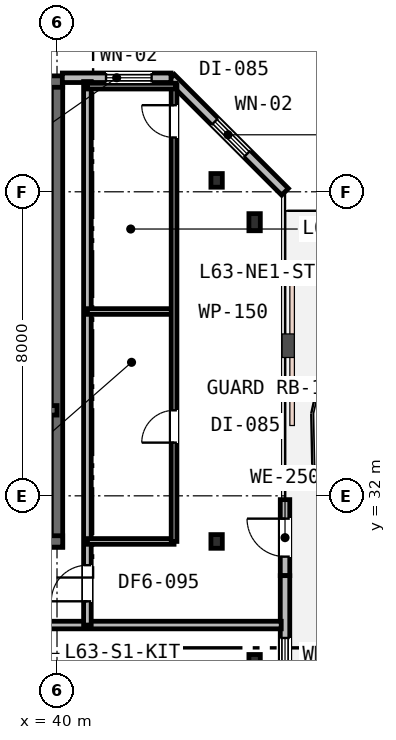
"""IFC4 building model, lengths in metres.
Left out: names, types, materials, properties, quantities, classifications, styles, units other than length and angle.
Written with IfcOpenShell. Run it as: python <this file> out.ifc"""

import sys

from ifc_helpers import new_model, si_unit, direction, frame, frame_2d, origin, origin_2d, place, context, subcontext, project, spatial, rectangle, i_section, extrude, element, fill, save


model = new_model("IFC4")
c1 = context("Model", 3, precision=1e-05, world=origin(), true_north=direction((0.0, 1.0)))
c2 = subcontext(c1, "Body", "Model", "MODEL_VIEW")
j1 = project(units=[si_unit("LENGTHUNIT", "METRE"), si_unit("PLANEANGLEUNIT", "RADIAN")], contexts=[c1])
p1 = place(None, origin())
s1 = spatial("IfcSite", under=j1, at=p1, CompositionType="ELEMENT")
p2 = place(p1, origin())
s2 = spatial("IfcBuilding", under=s1, at=p2, CompositionType="ELEMENT")
p3 = place(p2, frame((0.0, 0.0, 245.0)))
s3 = spatial("IfcBuildingStorey", under=s2, at=p3, CompositionType="ELEMENT", Elevation=245.0)
p4 = place(p3, frame((40.0, 30.65, 0.0), z_axis=(0.0, 0.0, 1.0), x_axis=(0.0, 1.0, 0.0)))
e1 = element("IfcWall", 1, at=p4, inside=s3, PredefinedType="SHEAR", context=c2, shape_type="SweptSolid", body=[
    extrude(rectangle(XDim=12.3, YDim=0.3, at=frame_2d((6.15, 0.0))), origin(), (0.0, 0.0, 1.0), 3.8),
])
p5 = place(p3, frame((15.85, 42.9, 0.0), z_axis=(0.0, 0.0, 1.0), x_axis=(1.0, 0.0, 0.0)))
e2 = element("IfcWall", 2, at=p5, inside=s3, PredefinedType="SHEAR", context=c2, shape_type="SweptSolid", body=[
    extrude(rectangle(XDim=24.3, YDim=0.3, at=frame_2d((12.15, 0.0))), origin(), (0.0, 0.0, 1.0), 3.8),
])
p6 = place(p5, frame((1.6, 0.0, 0.95)))
e3 = element("IfcOpeningElement", 3, at=p6, cuts=e2, PredefinedType="OPENING", context=c2, shape_type="SweptSolid", body=[
    extrude(rectangle(XDim=1.2, YDim=1.6, at=frame_2d((0.6, 0.8))), frame((0.0, 0.16, 0.0), z_axis=(0.0, -1.0, 0.0), x_axis=(1.0, 0.0, 0.0)), (0.0, 0.0, 1.0), 0.32),
])
p7 = place(p5, frame((16.5, 0.0, 0.95)))
e4 = element("IfcOpeningElement", 4, at=p7, cuts=e2, PredefinedType="OPENING", context=c2, shape_type="SweptSolid", body=[
    extrude(rectangle(XDim=1.2, YDim=1.6, at=frame_2d((0.6, 0.8))), frame((0.0, 0.16, 0.0), z_axis=(0.0, -1.0, 0.0), x_axis=(1.0, 0.0, 0.0)), (0.0, 0.0, 1.0), 0.32),
])
p8 = place(p5, frame((21.6, 0.0, 0.95)))
e5 = element("IfcOpeningElement", 5, at=p8, cuts=e2, PredefinedType="OPENING", context=c2, shape_type="SweptSolid", body=[
    extrude(rectangle(XDim=1.2, YDim=1.6, at=frame_2d((0.6, 0.8))), frame((0.0, 0.16, 0.0), z_axis=(0.0, -1.0, 0.0), x_axis=(1.0, 0.0, 0.0)), (0.0, 0.0, 1.0), 0.32),
])
p9 = place(p3, frame((28.95, 30.8, 0.0), z_axis=(0.0, 0.0, 1.0), x_axis=(1.0, 0.0, 0.0)))
e6 = element("IfcWall", 6, at=p9, inside=s3, PredefinedType="SHEAR", context=c2, shape_type="SweptSolid", body=[
    extrude(rectangle(XDim=11.2, YDim=0.3, at=frame_2d((5.6, 0.0))), origin(), (0.0, 0.0, 1.0), 3.8),
])
p10 = place(p9, frame((7.65, 0.0, 0.0)))
e7 = element("IfcOpeningElement", 7, at=p10, cuts=e6, PredefinedType="OPENING", context=c2, shape_type="SweptSolid", body=[
    extrude(rectangle(XDim=1.1, YDim=2.15, at=frame_2d((0.55, 1.075))), frame((0.0, 0.16, 0.0), z_axis=(0.0, -1.0, 0.0), x_axis=(1.0, 0.0, 0.0)), (0.0, 0.0, 1.0), 0.32),
])
p11 = place(p3, frame((33.95, 34.25, 0.0), z_axis=(0.0, 0.0, 1.0), x_axis=(1.0, 0.0, 0.0)))
e8 = element("IfcWall", 8, at=p11, inside=s3, PredefinedType="SHEAR", context=c2, shape_type="SweptSolid", body=[
    extrude(rectangle(XDim=6.05, YDim=0.25, at=frame_2d((3.025, 0.0))), origin(), (0.0, 0.0, 1.0), 3.8),
])
p12 = place(p11, frame((3.7, 0.0, 0.0)))
e9 = element("IfcOpeningElement", 9, at=p12, cuts=e8, PredefinedType="OPENING", context=c2, shape_type="SweptSolid", body=[
    extrude(rectangle(XDim=1.0, YDim=2.15, at=frame_2d((0.5, 1.075))), frame((0.0, 0.135, 0.0), z_axis=(0.0, -1.0, 0.0), x_axis=(1.0, 0.0, 0.0)), (0.0, 0.0, 1.0), 0.27),
])
p13 = place(p11, frame((0.55, 0.0, 0.0)))
e10 = element("IfcOpeningElement", 10, at=p13, cuts=e8, PredefinedType="OPENING", context=c2, shape_type="SweptSolid", body=[
    extrude(rectangle(XDim=1.1, YDim=2.15, at=frame_2d((0.55, 1.075))), frame((0.0, 0.135, 0.0), z_axis=(0.0, -1.0, 0.0), x_axis=(1.0, 0.0, 0.0)), (0.0, 0.0, 1.0), 0.27),
])
for number, where, z_axis, x_axis in (
    (11, (45.2, 27.6, 0.0), (0.0, 0.0, 1.0), (1.0, 0.0, 0.0)),
    (12, (45.2, 39.2, 0.0), (0.0, 0.0, 1.0), (1.0, 0.0, 0.0)),
):
    element("IfcColumn", number, at=place(p3, frame(where, z_axis=z_axis, x_axis=x_axis)), inside=s3, PredefinedType="COLUMN", context=c2, shape_type="SweptSolid", body=[
        extrude(i_section(OverallWidth=0.3, OverallDepth=0.45, WebThickness=0.014, FlangeThickness=0.026, FilletRadius=0.027, at=origin_2d()), origin(), (0.0, 0.0, 1.0), 3.8),
    ])
for number, where, z_axis, x_axis in (
    (13, (44.2, 30.8, 0.0), (0.0, 0.0, 1.0), (1.0, 0.0, 0.0)),
    (14, (44.2, 40.3, 0.0), (0.0, 0.0, 1.0), (1.0, 0.0, 0.0)),
):
    element("IfcColumn", number, at=place(p3, frame(where, z_axis=z_axis, x_axis=x_axis)), inside=s3, PredefinedType="COLUMN", context=c2, shape_type="SweptSolid", body=[
        extrude(i_section(OverallWidth=0.3, OverallDepth=0.36, WebThickness=0.013, FlangeThickness=0.022, FilletRadius=0.027, at=origin_2d()), origin(), (0.0, 0.0, 1.0), 3.8),
    ])
p14 = place(p3, frame((46.0, 29.9, 0.0), z_axis=(0.0, 0.0, 1.0), x_axis=(0.0, 1.0, 0.0)))
e15 = element("IfcWall", 15, at=p14, inside=s3, PredefinedType="STANDARD", context=c2, shape_type="SweptSolid", body=[
    extrude(rectangle(XDim=2.0, YDim=0.25, at=frame_2d((1.0, 0.0))), origin(), (0.0, 0.0, 1.0), 3.53),
])
p15 = place(p14, frame((0.5, 0.0, 0.0)))
e16 = element("IfcOpeningElement", 16, at=p15, cuts=e15, PredefinedType="OPENING", context=c2, shape_type="SweptSolid", body=[
    extrude(rectangle(XDim=1.0, YDim=2.15, at=frame_2d((0.5, 1.075))), frame((0.0, 0.135, 0.0), z_axis=(0.0, -1.0, 0.0), x_axis=(1.0, 0.0, 0.0)), (0.0, 0.0, 1.0), 0.27),
])
p16 = place(p3, frame((46.0, 27.0, 0.0), z_axis=(0.0, 0.0, 1.0), x_axis=(0.0, 1.0, 0.0)))
e17 = element("IfcWall", 17, at=p16, inside=s3, PredefinedType="STANDARD", context=c2, shape_type="SweptSolid", body=[
    extrude(rectangle(XDim=2.9, YDim=0.25, at=frame_2d((1.45, 0.0))), origin(), (0.0, 0.0, 1.0), 3.53),
])
p17 = place(p16, frame((0.36, 0.0, 0.9)))
e18 = element("IfcOpeningElement", 18, at=p17, cuts=e17, PredefinedType="OPENING", context=c2, shape_type="SweptSolid", body=[
    extrude(rectangle(XDim=0.9, YDim=1.55, at=frame_2d((0.45, 0.775))), frame((0.0, 0.135, 0.0), z_axis=(0.0, -1.0, 0.0), x_axis=(1.0, 0.0, 0.0)), (0.0, 0.0, 1.0), 0.27),
])
p18 = place(p3, frame((46.0, 40.0, 0.0), z_axis=(0.0, 0.0, 1.0), x_axis=(-0.707106781187, 0.707106781187, 0.0)))
e19 = element("IfcWall", 19, at=p18, inside=s3, PredefinedType="STANDARD", context=c2, shape_type="SweptSolid", body=[
    extrude(rectangle(XDim=4.243, YDim=0.25, at=frame_2d((2.121, 0.0))), origin(), (0.0, 0.0, 1.0), 3.53),
])
p19 = place(p18, frame((1.411, 0.0, 0.85)))
e20 = element("IfcOpeningElement", 20, at=p19, cuts=e19, PredefinedType="OPENING", context=c2, shape_type="SweptSolid", body=[
    extrude(rectangle(XDim=1.2, YDim=1.6, at=frame_2d((0.6, 0.8))), frame((0.0, 0.135, 0.0), z_axis=(0.0, -1.0, 0.0), x_axis=(1.0, 0.0, 0.0)), (0.0, 0.0, 1.0), 0.27),
])
p20 = place(p3, frame((43.0, 43.0, 0.0), z_axis=(0.0, 0.0, 1.0), x_axis=(-1.0, 0.0, 0.0)))
e21 = element("IfcWall", 21, at=p20, inside=s3, PredefinedType="STANDARD", context=c2, shape_type="SweptSolid", body=[
    extrude(rectangle(XDim=2.86, YDim=0.25, at=frame_2d((1.43, 0.0))), origin(), (0.0, 0.0, 1.0), 3.53),
])
p21 = place(p20, frame((0.51, 0.0, 0.85)))
e22 = element("IfcOpeningElement", 22, at=p21, cuts=e21, PredefinedType="OPENING", context=c2, shape_type="SweptSolid", body=[
    extrude(rectangle(XDim=1.2, YDim=1.6, at=frame_2d((0.6, 0.8))), frame((0.0, 0.135, 0.0), z_axis=(0.0, -1.0, 0.0), x_axis=(1.0, 0.0, 0.0)), (0.0, 0.0, 1.0), 0.27),
])
p22 = place(p3, frame((11.6, 28.6, 0.0), z_axis=(0.0, 0.0, 1.0), x_axis=(1.0, 0.0, 0.0)))
e23 = element("IfcWall", 23, at=p22, inside=s3, PredefinedType="PARTITIONING", context=c2, shape_type="SweptSolid", body=[
    extrude(rectangle(XDim=34.3, YDim=0.2, at=frame_2d((17.15, 0.0))), origin(), (0.0, 0.0, 1.0), 3.16),
])
p23 = place(p22, frame((14.625, 0.0, 0.0)))
e24 = element("IfcOpeningElement", 24, at=p23, cuts=e23, PredefinedType="OPENING", context=c2, shape_type="SweptSolid", body=[
    extrude(rectangle(XDim=0.95, YDim=2.15, at=frame_2d((0.475, 1.075))), frame((0.0, 0.11, 0.0), z_axis=(0.0, -1.0, 0.0), x_axis=(1.0, 0.0, 0.0)), (0.0, 0.0, 1.0), 0.22),
])
p24 = place(p22, frame((26.225, 0.0, 0.0)))
e25 = element("IfcOpeningElement", 25, at=p24, cuts=e23, PredefinedType="OPENING", context=c2, shape_type="SweptSolid", body=[
    extrude(rectangle(XDim=0.95, YDim=2.15, at=frame_2d((0.475, 1.075))), frame((0.0, 0.11, 0.0), z_axis=(0.0, -1.0, 0.0), x_axis=(1.0, 0.0, 0.0)), (0.0, 0.0, 1.0), 0.22),
])
p25 = place(p3, frame((40.8, 28.6, 0.0), z_axis=(0.0, 0.0, 1.0), x_axis=(0.0, 1.0, 0.0)))
e26 = element("IfcWall", 26, at=p25, inside=s3, PredefinedType="PARTITIONING", context=c2, shape_type="SweptSolid", body=[
    extrude(rectangle(XDim=14.3, YDim=0.2, at=frame_2d((7.15, 0.0))), origin(), (0.0, 0.0, 1.0), 3.16),
])
p26 = place(p25, frame((0.625, 0.0, 0.0)))
e27 = element("IfcOpeningElement", 27, at=p26, cuts=e26, PredefinedType="OPENING", context=c2, shape_type="SweptSolid", body=[
    extrude(rectangle(XDim=0.95, YDim=2.15, at=frame_2d((0.475, 1.075))), frame((0.0, 0.11, 0.0), z_axis=(0.0, -1.0, 0.0), x_axis=(1.0, 0.0, 0.0)), (0.0, 0.0, 1.0), 0.22),
])
p27 = place(p3, frame((40.8, 30.8, 0.0), z_axis=(0.0, 0.0, 1.0), x_axis=(1.0, 0.0, 0.0)))
e28 = element("IfcWall", 28, at=p27, inside=s3, PredefinedType="PARTITIONING", context=c2, shape_type="SweptSolid", body=[
    extrude(rectangle(XDim=2.28, YDim=0.15, at=frame_2d((1.14, 0.0))), origin(), (0.0, 0.0, 1.0), 3.16),
])
p28 = place(p3, frame((40.8, 36.85, 0.0), z_axis=(0.0, 0.0, 1.0), x_axis=(1.0, 0.0, 0.0)))
e29 = element("IfcWall", 29, at=p28, inside=s3, PredefinedType="PARTITIONING", context=c2, shape_type="SweptSolid", body=[
    extrude(rectangle(XDim=2.28, YDim=0.15, at=frame_2d((1.14, 0.0))), origin(), (0.0, 0.0, 1.0), 3.53),
])
p29 = place(p3, frame((43.08, 30.8, 0.0), z_axis=(0.0, 0.0, 1.0), x_axis=(0.0, 1.0, 0.0)))
e30 = element("IfcWall", 30, at=p29, inside=s3, PredefinedType="PARTITIONING", context=c2, shape_type="SweptSolid", body=[
    extrude(rectangle(XDim=12.02, YDim=0.15, at=frame_2d((6.01, 0.0))), origin(), (0.0, 0.0, 1.0), 3.16),
])
p30 = place(p29, frame((2.6, 0.0, 0.0)))
e31 = element("IfcOpeningElement", 31, at=p30, cuts=e30, PredefinedType="OPENING", context=c2, shape_type="SweptSolid", body=[
    extrude(rectangle(XDim=0.85, YDim=2.15, at=frame_2d((0.425, 1.075))), frame((0.0, 0.085, 0.0), z_axis=(0.0, -1.0, 0.0), x_axis=(1.0, 0.0, 0.0)), (0.0, 0.0, 1.0), 0.17),
])
p31 = place(p29, frame((10.629, 0.0, 0.0)))
e32 = element("IfcOpeningElement", 32, at=p31, cuts=e30, PredefinedType="OPENING", context=c2, shape_type="SweptSolid", body=[
    extrude(rectangle(XDim=0.85, YDim=2.15, at=frame_2d((0.425, 1.075))), frame((0.0, 0.085, 0.0), z_axis=(0.0, -1.0, 0.0), x_axis=(1.0, 0.0, 0.0)), (0.0, 0.0, 1.0), 0.17),
])
p32 = place(p3, frame((40.8, 42.78, 0.0), z_axis=(0.0, 0.0, 1.0), x_axis=(1.0, 0.0, 0.0)))
e33 = element("IfcWall", 33, at=p32, inside=s3, PredefinedType="PARTITIONING", context=c2, shape_type="SweptSolid", body=[
    extrude(rectangle(XDim=2.32, YDim=0.15, at=frame_2d((1.16, 0.0))), origin(), (0.0, 0.0, 1.0), 3.53),
])
p33 = place(p15, origin())
e34 = element("IfcDoor", 34, at=p33, inside=s3, OperationType="SINGLE_SWING_RIGHT", PredefinedType="DOOR", context=c2, shape_type="SweptSolid", body=[
    extrude(rectangle(XDim=1.0, YDim=2.15, at=frame_2d((0.5, 1.075))), frame((0.0, 0.025, 0.0), z_axis=(0.0, -1.0, 0.0), x_axis=(1.0, 0.0, 0.0)), (0.0, 0.0, 1.0), 0.05),
])
fill(e16, e34)
p34 = place(p17, origin())
e35 = element("IfcWindow", 35, at=p34, inside=s3, PartitioningType="SINGLE_PANEL", PredefinedType="WINDOW", context=c2, shape_type="SweptSolid", body=[
    extrude(rectangle(XDim=0.9, YDim=1.55, at=frame_2d((0.45, 0.775))), frame((0.0, 0.03, 0.0), z_axis=(0.0, -1.0, 0.0), x_axis=(1.0, 0.0, 0.0)), (0.0, 0.0, 1.0), 0.06),
])
fill(e18, e35)
p35 = place(p19, origin())
e36 = element("IfcWindow", 36, at=p35, inside=s3, PartitioningType="SINGLE_PANEL", PredefinedType="WINDOW", context=c2, shape_type="SweptSolid", body=[
    extrude(rectangle(XDim=1.2, YDim=1.6, at=frame_2d((0.6, 0.8))), frame((0.0, 0.03, 0.0), z_axis=(0.0, -1.0, 0.0), x_axis=(1.0, 0.0, 0.0)), (0.0, 0.0, 1.0), 0.06),
])
fill(e20, e36)
p36 = place(p21, origin())
e37 = element("IfcWindow", 37, at=p36, inside=s3, PartitioningType="SINGLE_PANEL", PredefinedType="WINDOW", context=c2, shape_type="SweptSolid", body=[
    extrude(rectangle(XDim=1.2, YDim=1.6, at=frame_2d((0.6, 0.8))), frame((0.0, 0.03, 0.0), z_axis=(0.0, -1.0, 0.0), x_axis=(1.0, 0.0, 0.0)), (0.0, 0.0, 1.0), 0.06),
])
fill(e22, e37)
p37 = place(p26, origin())
e38 = element("IfcDoor", 38, at=p37, inside=s3, OperationType="SINGLE_SWING_LEFT", PredefinedType="DOOR", context=c2, shape_type="SweptSolid", body=[
    extrude(rectangle(XDim=0.95, YDim=2.15, at=frame_2d((0.475, 1.075))), frame((0.0, 0.025, 0.0), z_axis=(0.0, -1.0, 0.0), x_axis=(1.0, 0.0, 0.0)), (0.0, 0.0, 1.0), 0.05),
])
fill(e27, e38)
p38 = place(p30, origin())
e39 = element("IfcDoor", 39, at=p38, inside=s3, OperationType="SINGLE_SWING_LEFT", PredefinedType="DOOR", context=c2, shape_type="SweptSolid", body=[
    extrude(rectangle(XDim=0.85, YDim=2.15, at=frame_2d((0.425, 1.075))), frame((0.0, 0.025, 0.0), z_axis=(0.0, -1.0, 0.0), x_axis=(1.0, 0.0, 0.0)), (0.0, 0.0, 1.0), 0.05),
])
fill(e31, e39)
p39 = place(p31, origin())
e40 = element("IfcDoor", 40, at=p39, inside=s3, OperationType="SINGLE_SWING_RIGHT", PredefinedType="DOOR", context=c2, shape_type="SweptSolid", body=[
    extrude(rectangle(XDim=0.85, YDim=2.15, at=frame_2d((0.425, 1.075))), frame((0.0, 0.025, 0.0), z_axis=(0.0, -1.0, 0.0), x_axis=(1.0, 0.0, 0.0)), (0.0, 0.0, 1.0), 0.05),
])
fill(e32, e40)
save(model, sys.argv[1])
